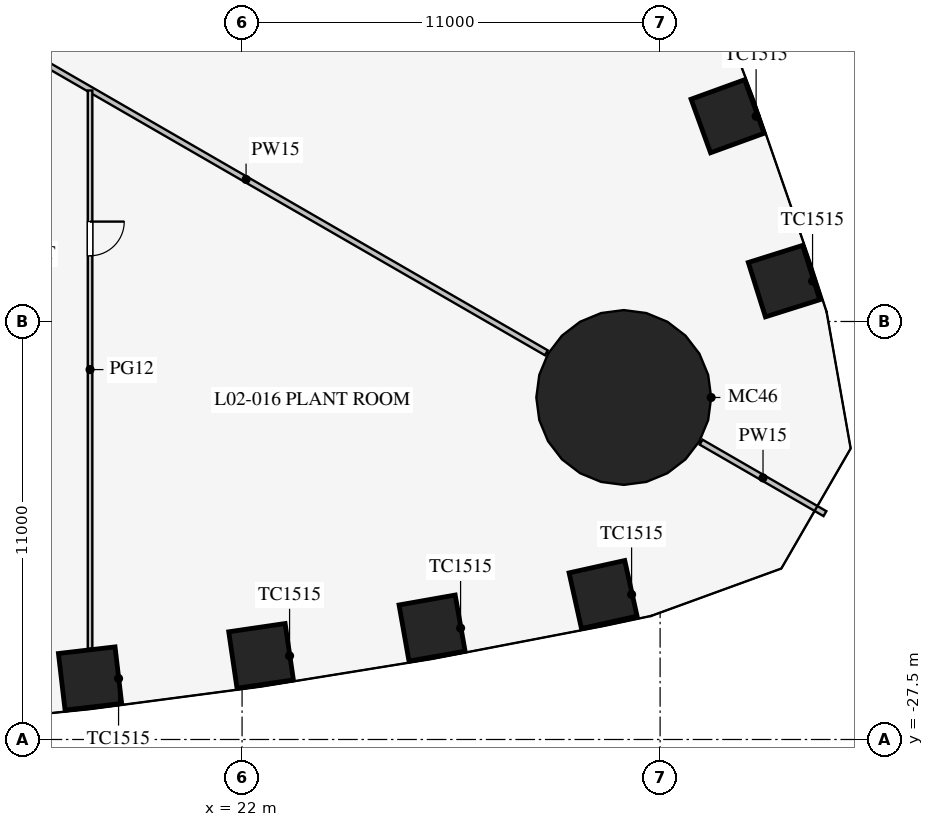
"""IFC4 building model, lengths in metres.
Left out: names, types, materials, properties, quantities, classifications, styles, units other than length and angle.
Written with IfcOpenShell. Run it as: python <this file> out.ifc"""

import sys

from ifc_helpers import new_model, si_unit, direction, frame, frame_2d, origin, origin_2d, place, context, subcontext, project, spatial, rectangle, circle, extrude, element, fill, save


model = new_model("IFC4")
c1 = context("Model", 3, precision=1e-05, world=origin(), true_north=direction((0.0, 1.0)))
c2 = subcontext(c1, "Body", "Model", "MODEL_VIEW")
j1 = project(units=[si_unit("LENGTHUNIT", "METRE"), si_unit("PLANEANGLEUNIT", "RADIAN")], contexts=[c1])
p1 = place(None, origin())
s1 = spatial("IfcSite", under=j1, at=p1, CompositionType="ELEMENT")
p2 = place(p1, origin())
s2 = spatial("IfcBuilding", under=s1, at=p2, CompositionType="ELEMENT")
p3 = place(p2, frame((0.0, 0.0, 11.5)))
s3 = spatial("IfcBuildingStorey", under=s2, at=p3, CompositionType="ELEMENT", Elevation=11.5)
for number, where, z_axis, x_axis in (
    (1, (18.0, -25.895, 0.0), (0.0, 0.0, 1.0), (0.993, 0.116, 0.0)),
    (2, (22.5, -25.299, 0.0), (0.0, 0.0, 1.0), (0.989, 0.145, 0.0)),
    (3, (27.0, -24.568, 0.0), (0.0, 0.0, 1.0), (0.985, 0.174, 0.0)),
    (4, (31.5, -23.685, 0.0), (0.0, 0.0, 1.0), (0.976, 0.217, 0.0)),
    (5, (36.262, -15.438, 0.0), (0.0, 0.0, 1.0), (-0.3, 0.954, 0.0)),
    (6, (34.776, -11.099, 0.0), (0.0, 0.0, 1.0), (-0.342, 0.94, 0.0)),
):
    element("IfcColumn", number, at=place(p3, frame(where, z_axis=z_axis, x_axis=x_axis)), inside=s3, PredefinedType="COLUMN", context=c2, shape_type="SweptSolid", body=[
        extrude(rectangle(XDim=1.5, YDim=1.5, at=origin_2d()), origin(), (0.0, 0.0, 1.0), 5.0),
    ])
p4 = place(p3, frame((32.043, -18.5, 0.0), z_axis=(0.0, 0.0, 1.0), x_axis=(1.0, 0.0, 0.0)))
e7 = element("IfcColumn", 7, at=p4, inside=s3, PredefinedType="COLUMN", context=c2, shape_type="SweptSolid", body=[
    extrude(circle(Radius=2.3, at=origin_2d()), origin(), (0.0, 0.0, 1.0), 5.0),
])
p5 = place(p3, frame((10.97, -13.0, 0.0), z_axis=(0.0, 0.0, 1.0), x_axis=(0.499995765644, 0.866027848477, 0.0)))
e8 = element("IfcWall", 8, at=p5, inside=s3, PredefinedType="SHEAR", context=c2, shape_type="SweptSolid", body=[
    extrude(rectangle(XDim=11.547, YDim=0.8, at=frame_2d((5.773, 0.0))), origin(), (0.0, 0.0, 1.0), 5.0),
])
p6 = place(p3, frame((14.203, -8.2, 0.0), z_axis=(0.0, 0.0, 1.0), x_axis=(0.866024965723, -0.500000758745, 0.0)))
e9 = element("IfcWall", 9, at=p6, inside=s3, PredefinedType="PARTITIONING", context=c2, shape_type="SweptSolid", body=[
    extrude(rectangle(XDim=18.25, YDim=0.15, at=frame_2d((9.125, 0.0))), origin(), (0.0, 0.0, 1.0), 3.1),
])
p7 = place(p3, frame((34.078, -19.675, 0.0), z_axis=(0.0, 0.0, 1.0), x_axis=(0.866019247219, -0.500010663332, 0.0)))
e10 = element("IfcWall", 10, at=p7, inside=s3, PredefinedType="PARTITIONING", context=c2, shape_type="SweptSolid", body=[
    extrude(rectangle(XDim=3.764, YDim=0.15, at=frame_2d((1.882, 0.0))), origin(), (0.0, 0.0, 1.0), 3.1),
])
p8 = place(p3, frame((18.0, -10.421, 0.0), z_axis=(0.0, 0.0, 1.0), x_axis=(0.0, -1.0, 0.0)))
e11 = element("IfcWall", 11, at=p8, inside=s3, PredefinedType="PARTITIONING", context=c2, shape_type="SweptSolid", body=[
    extrude(rectangle(XDim=14.688, YDim=0.12, at=frame_2d((7.344, 0.0))), origin(), (0.0, 0.0, 1.0), 3.6),
])
p9 = place(p8, frame((3.45, 0.0, 0.0)))
e12 = element("IfcOpeningElement", 12, at=p9, cuts=e11, PredefinedType="OPENING", context=c2, shape_type="SweptSolid", body=[
    extrude(rectangle(XDim=0.9, YDim=2.1, at=frame_2d((0.45, 1.05))), frame((0.0, 0.07, 0.0), z_axis=(0.0, -1.0, 0.0), x_axis=(1.0, 0.0, 0.0)), (0.0, 0.0, 1.0), 0.14),
])
p10 = place(p9, origin())
e13 = element("IfcDoor", 13, at=p10, inside=s3, OperationType="SINGLE_SWING_LEFT", PredefinedType="DOOR", context=c2, shape_type="SweptSolid", body=[
    extrude(rectangle(XDim=0.9, YDim=2.1, at=frame_2d((0.45, 1.05))), frame((0.0, 0.025, 0.0), z_axis=(0.0, -1.0, 0.0), x_axis=(1.0, 0.0, 0.0)), (0.0, 0.0, 1.0), 0.05),
])
fill(e12, e13)
save(model, sys.argv[1])
